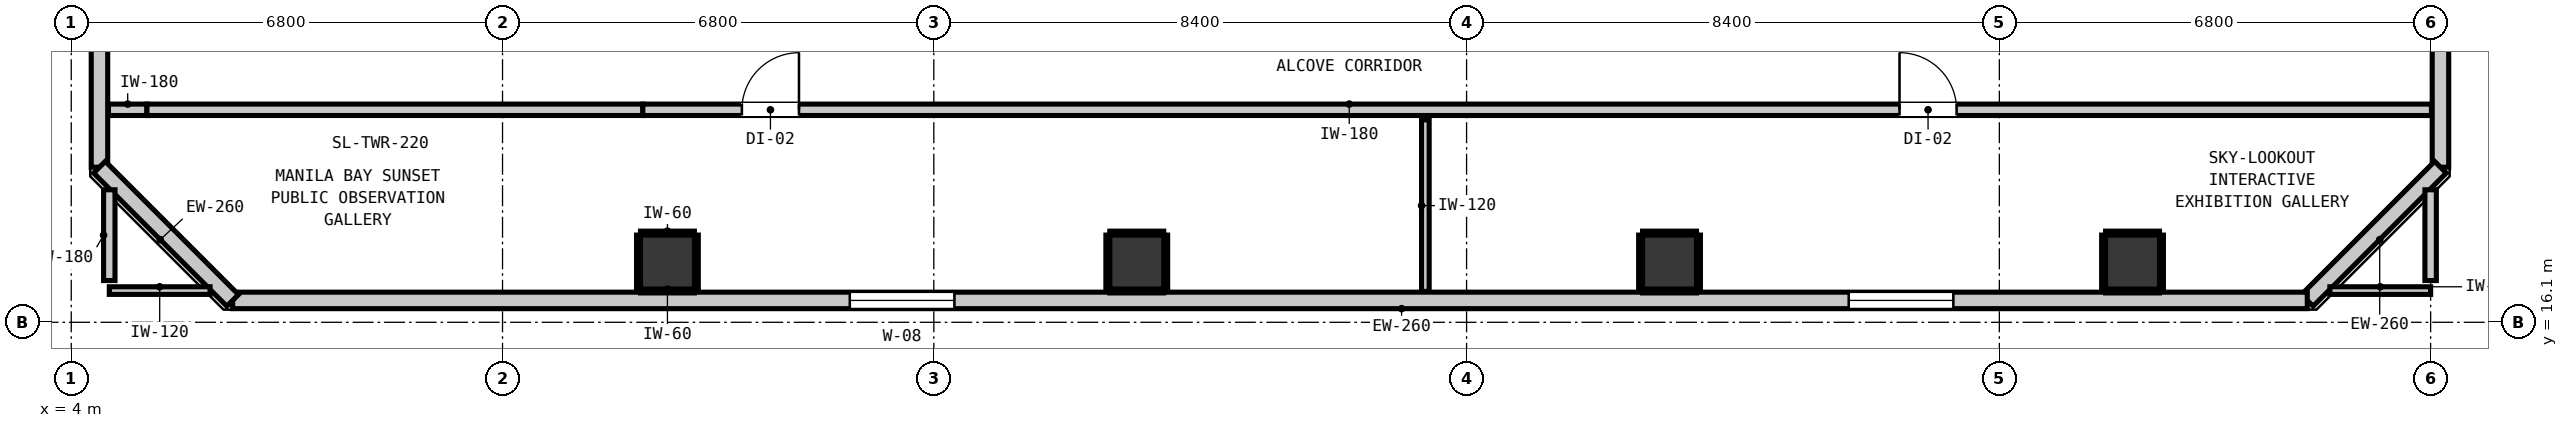
"""IFC4 building model, lengths in metres.
Left out: names, types, materials, properties, quantities, classifications, styles, units other than length and angle.
Written with IfcOpenShell. Run it as: python <this file> out.ifc"""

import sys

from ifc_helpers import new_model, si_unit, direction, frame, frame_2d, origin, origin_2d, place, context, subcontext, project, spatial, rectangle, extrude, element, fill, save


model = new_model("IFC4")
c1 = context("Model", 3, precision=1e-05, world=origin(), true_north=direction((0.0, 1.0)))
c2 = subcontext(c1, "Body", "Model", "MODEL_VIEW")
j1 = project(units=[si_unit("LENGTHUNIT", "METRE"), si_unit("PLANEANGLEUNIT", "RADIAN")], contexts=[c1])
p1 = place(None, origin())
s1 = spatial("IfcSite", under=j1, at=p1, CompositionType="ELEMENT")
p2 = place(p1, origin())
s2 = spatial("IfcBuilding", under=s1, at=p2, CompositionType="ELEMENT")
p3 = place(p2, frame((0.0, 0.0, 268.88)))
s3 = spatial("IfcBuildingStorey", under=s2, at=p3, CompositionType="ELEMENT", Elevation=268.88)
for number, where, z_axis, x_axis in (
    (1, (13.4, 17.05, 0.0), (0.0, 0.0, 1.0), (1.0, 0.0, 0.0)),
    (2, (20.8, 17.05, 0.0), (0.0, 0.0, 1.0), (1.0, 0.0, 0.0)),
    (3, (29.2, 17.05, 0.0), (0.0, 0.0, 1.0), (1.0, 0.0, 0.0)),
    (4, (36.5, 17.05, 0.0), (0.0, 0.0, 1.0), (1.0, 0.0, 0.0)),
):
    element("IfcColumn", number, at=place(p3, frame(where, z_axis=z_axis, x_axis=x_axis)), inside=s3, PredefinedType="COLUMN", context=c2, shape_type="SweptSolid", body=[
        extrude(rectangle(XDim=0.85, YDim=0.85, at=origin_2d()), origin(), (0.0, 0.0, 1.0), 4.6),
    ])
p4 = place(p3, frame((4.445, 18.545, 0.0), z_axis=(0.0, 0.0, 1.0), x_axis=(0.0, 1.0, 0.0)))
e5 = element("IfcWall", 5, at=p4, inside=s3, PredefinedType="STANDARD", context=c2, shape_type="SweptSolid", body=[
    extrude(rectangle(XDim=30.31, YDim=0.26, at=frame_2d((15.155, 0.0))), origin(), (0.0, 0.0, 1.0), 4.38),
])
p5 = place(p4, frame((26.038, 0.0, 0.85)))
e6 = element("IfcOpeningElement", 6, at=p5, cuts=e5, PredefinedType="OPENING", context=c2, shape_type="SweptSolid", body=[
    extrude(rectangle(XDim=1.65, YDim=1.75, at=frame_2d((0.825, 0.875))), frame((0.0, 0.14, 0.0), z_axis=(0.0, -1.0, 0.0), x_axis=(1.0, 0.0, 0.0)), (0.0, 0.0, 1.0), 0.28),
])
p6 = place(p3, frame((41.355, 48.855, 0.0), z_axis=(0.0, 0.0, 1.0), x_axis=(0.0, -1.0, 0.0)))
e7 = element("IfcWall", 7, at=p6, inside=s3, PredefinedType="STANDARD", context=c2, shape_type="SweptSolid", body=[
    extrude(rectangle(XDim=30.31, YDim=0.26, at=frame_2d((15.155, 0.0))), origin(), (0.0, 0.0, 1.0), 4.38),
])
p7 = place(p6, frame((2.622, 0.0, 0.85)))
e8 = element("IfcOpeningElement", 8, at=p7, cuts=e7, PredefinedType="OPENING", context=c2, shape_type="SweptSolid", body=[
    extrude(rectangle(XDim=1.65, YDim=1.75, at=frame_2d((0.825, 0.875))), frame((0.0, 0.14, 0.0), z_axis=(0.0, -1.0, 0.0), x_axis=(1.0, 0.0, 0.0)), (0.0, 0.0, 1.0), 0.28),
])
p8 = place(p6, frame((22.103, 0.0, 0.85)))
e9 = element("IfcOpeningElement", 9, at=p8, cuts=e7, PredefinedType="OPENING", context=c2, shape_type="SweptSolid", body=[
    extrude(rectangle(XDim=1.65, YDim=1.75, at=frame_2d((0.825, 0.875))), frame((0.0, 0.14, 0.0), z_axis=(0.0, -1.0, 0.0), x_axis=(1.0, 0.0, 0.0)), (0.0, 0.0, 1.0), 0.28),
])
p9 = place(p6, frame((12.98, 0.0, 0.85)))
e10 = element("IfcOpeningElement", 10, at=p9, cuts=e7, PredefinedType="OPENING", context=c2, shape_type="SweptSolid", body=[
    extrude(rectangle(XDim=1.65, YDim=1.75, at=frame_2d((0.825, 0.875))), frame((0.0, 0.14, 0.0), z_axis=(0.0, -1.0, 0.0), x_axis=(1.0, 0.0, 0.0)), (0.0, 0.0, 1.0), 0.28),
])
p10 = place(p3, frame((41.355, 18.545, 0.0), z_axis=(0.0, 0.0, 1.0), x_axis=(-0.707147883682, -0.707065676302, 0.0)))
e11 = element("IfcWall", 11, at=p10, inside=s3, PredefinedType="STANDARD", context=c2, shape_type="SweptSolid", body=[
    extrude(rectangle(XDim=2.97, YDim=0.26, at=frame_2d((1.485, 0.0))), origin(), (0.0, 0.0, 1.0), 4.38),
])
p11 = place(p3, frame((39.255, 16.445, 0.0), z_axis=(0.0, 0.0, 1.0), x_axis=(-1.0, 0.0, 0.0)))
e12 = element("IfcWall", 12, at=p11, inside=s3, PredefinedType="STANDARD", context=c2, shape_type="SweptSolid", body=[
    extrude(rectangle(XDim=32.71, YDim=0.26, at=frame_2d((16.355, 0.0))), origin(), (0.0, 0.0, 1.0), 4.38),
])
p12 = place(p11, frame((21.33, 0.0, 0.85)))
e13 = element("IfcOpeningElement", 13, at=p12, cuts=e12, PredefinedType="OPENING", context=c2, shape_type="SweptSolid", body=[
    extrude(rectangle(XDim=1.65, YDim=1.75, at=frame_2d((0.825, 0.875))), frame((0.0, 0.14, 0.0), z_axis=(0.0, -1.0, 0.0), x_axis=(1.0, 0.0, 0.0)), (0.0, 0.0, 1.0), 0.28),
])
p13 = place(p11, frame((5.58, 0.0, 0.85)))
e14 = element("IfcOpeningElement", 14, at=p13, cuts=e12, PredefinedType="OPENING", context=c2, shape_type="SweptSolid", body=[
    extrude(rectangle(XDim=1.65, YDim=1.75, at=frame_2d((0.825, 0.875))), frame((0.0, 0.14, 0.0), z_axis=(0.0, -1.0, 0.0), x_axis=(1.0, 0.0, 0.0)), (0.0, 0.0, 1.0), 0.28),
])
p14 = place(p3, frame((6.545, 16.445, 0.0), z_axis=(0.0, 0.0, 1.0), x_axis=(-0.707106781187, 0.707106781187, 0.0)))
e15 = element("IfcWall", 15, at=p14, inside=s3, PredefinedType="STANDARD", context=c2, shape_type="SweptSolid", body=[
    extrude(rectangle(XDim=2.97, YDim=0.26, at=frame_2d((1.485, 0.0))), origin(), (0.0, 0.0, 1.0), 4.38),
])
p15 = place(p3, frame((4.587, 19.45, 0.0), z_axis=(0.0, 0.0, 1.0), x_axis=(1.0, 0.0, 0.0)))
e16 = element("IfcWall", 16, at=p15, inside=s3, PredefinedType="PARTITIONING", context=c2, shape_type="SweptSolid", body=[
    extrude(rectangle(XDim=0.606, YDim=0.18, at=frame_2d((0.303, 0.0))), origin(), (0.0, 0.0, 1.0), 4.38),
])
p16 = place(p3, frame((5.193, 19.45, 0.0), z_axis=(0.0, 0.0, 1.0), x_axis=(1.0, 0.0, 0.0)))
e17 = element("IfcWall", 17, at=p16, inside=s3, PredefinedType="PARTITIONING", context=c2, shape_type="SweptSolid", body=[
    extrude(rectangle(XDim=7.819, YDim=0.18, at=frame_2d((3.909, 0.0))), origin(), (0.0, 0.0, 1.0), 3.757),
])
p17 = place(p3, frame((13.012, 19.45, 0.0), z_axis=(0.0, 0.0, 1.0), x_axis=(1.0, 0.0, 0.0)))
e18 = element("IfcWall", 18, at=p17, inside=s3, PredefinedType="PARTITIONING", context=c2, shape_type="SweptSolid", body=[
    extrude(rectangle(XDim=28.201, YDim=0.18, at=frame_2d((14.101, 0.0))), origin(), (0.0, 0.0, 1.0), 4.38),
])
p18 = place(p17, frame((1.562, 0.0, 0.0)))
e19 = element("IfcOpeningElement", 19, at=p18, cuts=e18, PredefinedType="OPENING", context=c2, shape_type="SweptSolid", body=[
    extrude(rectangle(XDim=0.9, YDim=2.1, at=frame_2d((0.45, 1.05))), frame((0.0, 0.1, 0.0), z_axis=(0.0, -1.0, 0.0), x_axis=(1.0, 0.0, 0.0)), (0.0, 0.0, 1.0), 0.2),
])
p19 = place(p17, frame((19.814, 0.0, 0.0)))
e20 = element("IfcOpeningElement", 20, at=p19, cuts=e18, PredefinedType="OPENING", context=c2, shape_type="SweptSolid", body=[
    extrude(rectangle(XDim=0.9, YDim=2.1, at=frame_2d((0.45, 1.05))), frame((0.0, 0.1, 0.0), z_axis=(0.0, -1.0, 0.0), x_axis=(1.0, 0.0, 0.0)), (0.0, 0.0, 1.0), 0.2),
])
for number, where, z_axis, x_axis in (
    (21, (4.6, 16.6, 0.0), (0.0, 0.0, 1.0), (1.0, 0.0, 0.0)),
    (22, (39.611, 16.6, 0.0), (0.0, 0.0, 1.0), (1.0, 0.0, 0.0)),
):
    element("IfcWall", number, at=place(p3, frame(where, z_axis=z_axis, x_axis=x_axis)), inside=s3, PredefinedType="PARTITIONING", context=c2, shape_type="SweptSolid", body=[
        extrude(rectangle(XDim=1.589, YDim=0.12, at=frame_2d((0.794, 0.0))), origin(), (0.0, 0.0, 1.0), 4.38),
    ])
for number, where, z_axis, x_axis in (
    (23, (4.6, 16.758, 0.0), (0.0, 0.0, 1.0), (0.0, 1.0, 0.0)),
    (24, (41.2, 16.758, 0.0), (0.0, 0.0, 1.0), (0.0, 1.0, 0.0)),
):
    element("IfcWall", number, at=place(p3, frame(where, z_axis=z_axis, x_axis=x_axis)), inside=s3, PredefinedType="PARTITIONING", context=c2, shape_type="SweptSolid", body=[
        extrude(rectangle(XDim=1.431, YDim=0.18, at=frame_2d((0.715, 0.0))), origin(), (0.0, 0.0, 1.0), 4.38),
    ])
p20 = place(p3, frame((25.35, 16.587, 0.0), z_axis=(0.0, 0.0, 1.0), x_axis=(0.0, 1.0, 0.0)))
e25 = element("IfcWall", 25, at=p20, inside=s3, PredefinedType="PARTITIONING", context=c2, shape_type="SweptSolid", body=[
    extrude(rectangle(XDim=2.705, YDim=0.12, at=frame_2d((1.353, 0.0))), origin(), (0.0, 0.0, 1.0), 4.38),
])
for number, where, z_axis, x_axis in (
    (26, (12.975, 16.593, 0.0), (0.0, 0.0, 1.0), (1.0, 0.0, 0.0)),
    (27, (12.975, 17.507, 0.0), (0.0, 0.0, 1.0), (1.0, 0.0, 0.0)),
):
    element("IfcWall", number, at=place(p3, frame(where, z_axis=z_axis, x_axis=x_axis)), inside=s3, PredefinedType="PARTITIONING", context=c2, shape_type="SweptSolid", body=[
        extrude(rectangle(XDim=0.85, YDim=0.06, at=frame_2d((0.425, 0.0))), origin(), (0.0, 0.0, 1.0), 1.45),
    ])
for number, where, z_axis, x_axis in (
    (28, (12.943, 16.625, 0.0), (0.0, 0.0, 1.0), (0.0, 1.0, 0.0)),
    (29, (13.857, 16.625, 0.0), (0.0, 0.0, 1.0), (0.0, 1.0, 0.0)),
    (30, (20.375, 16.593, 0.0), (0.0, 0.0, 1.0), (1.0, 0.0, 0.0)),
    (31, (20.375, 17.507, 0.0), (0.0, 0.0, 1.0), (1.0, 0.0, 0.0)),
    (32, (20.343, 16.625, 0.0), (0.0, 0.0, 1.0), (0.0, 1.0, 0.0)),
    (33, (21.257, 16.625, 0.0), (0.0, 0.0, 1.0), (0.0, 1.0, 0.0)),
    (34, (28.775, 16.593, 0.0), (0.0, 0.0, 1.0), (1.0, 0.0, 0.0)),
    (35, (28.775, 17.507, 0.0), (0.0, 0.0, 1.0), (1.0, 0.0, 0.0)),
    (36, (28.743, 16.625, 0.0), (0.0, 0.0, 1.0), (0.0, 1.0, 0.0)),
    (37, (29.657, 16.625, 0.0), (0.0, 0.0, 1.0), (0.0, 1.0, 0.0)),
    (38, (36.075, 16.593, 0.0), (0.0, 0.0, 1.0), (1.0, 0.0, 0.0)),
    (39, (36.075, 17.507, 0.0), (0.0, 0.0, 1.0), (1.0, 0.0, 0.0)),
    (40, (36.043, 16.625, 0.0), (0.0, 0.0, 1.0), (0.0, 1.0, 0.0)),
    (41, (36.957, 16.625, 0.0), (0.0, 0.0, 1.0), (0.0, 1.0, 0.0)),
):
    element("IfcWall", number, at=place(p3, frame(where, z_axis=z_axis, x_axis=x_axis)), inside=s3, PredefinedType="PARTITIONING", context=c2, shape_type="SweptSolid", body=[
        extrude(rectangle(XDim=0.85, YDim=0.06, at=frame_2d((0.425, 0.0))), origin(), (0.0, 0.0, 1.0), 1.45),
    ])
p21 = place(p12, origin())
e42 = element("IfcWindow", 42, at=p21, inside=s3, PartitioningType="SINGLE_PANEL", PredefinedType="WINDOW", context=c2, shape_type="SweptSolid", body=[
    extrude(rectangle(XDim=1.65, YDim=1.75, at=frame_2d((0.825, 0.875))), frame((0.0, 0.03, 0.0), z_axis=(0.0, -1.0, 0.0), x_axis=(1.0, 0.0, 0.0)), (0.0, 0.0, 1.0), 0.06),
])
fill(e13, e42)
p22 = place(p13, origin())
e43 = element("IfcWindow", 43, at=p22, inside=s3, PartitioningType="SINGLE_PANEL", PredefinedType="WINDOW", context=c2, shape_type="SweptSolid", body=[
    extrude(rectangle(XDim=1.65, YDim=1.75, at=frame_2d((0.825, 0.875))), frame((0.0, 0.03, 0.0), z_axis=(0.0, -1.0, 0.0), x_axis=(1.0, 0.0, 0.0)), (0.0, 0.0, 1.0), 0.06),
])
fill(e14, e43)
p23 = place(p18, origin())
e44 = element("IfcDoor", 44, at=p23, inside=s3, OperationType="SINGLE_SWING_RIGHT", PredefinedType="DOOR", context=c2, shape_type="SweptSolid", body=[
    extrude(rectangle(XDim=0.9, YDim=2.1, at=frame_2d((0.45, 1.05))), frame((0.0, 0.025, 0.0), z_axis=(0.0, -1.0, 0.0), x_axis=(1.0, 0.0, 0.0)), (0.0, 0.0, 1.0), 0.05),
])
fill(e19, e44)
p24 = place(p19, origin())
e45 = element("IfcDoor", 45, at=p24, inside=s3, OperationType="SINGLE_SWING_LEFT", PredefinedType="DOOR", context=c2, shape_type="SweptSolid", body=[
    extrude(rectangle(XDim=0.9, YDim=2.1, at=frame_2d((0.45, 1.05))), frame((0.0, 0.025, 0.0), z_axis=(0.0, -1.0, 0.0), x_axis=(1.0, 0.0, 0.0)), (0.0, 0.0, 1.0), 0.05),
])
fill(e20, e45)
save(model, sys.argv[1])
